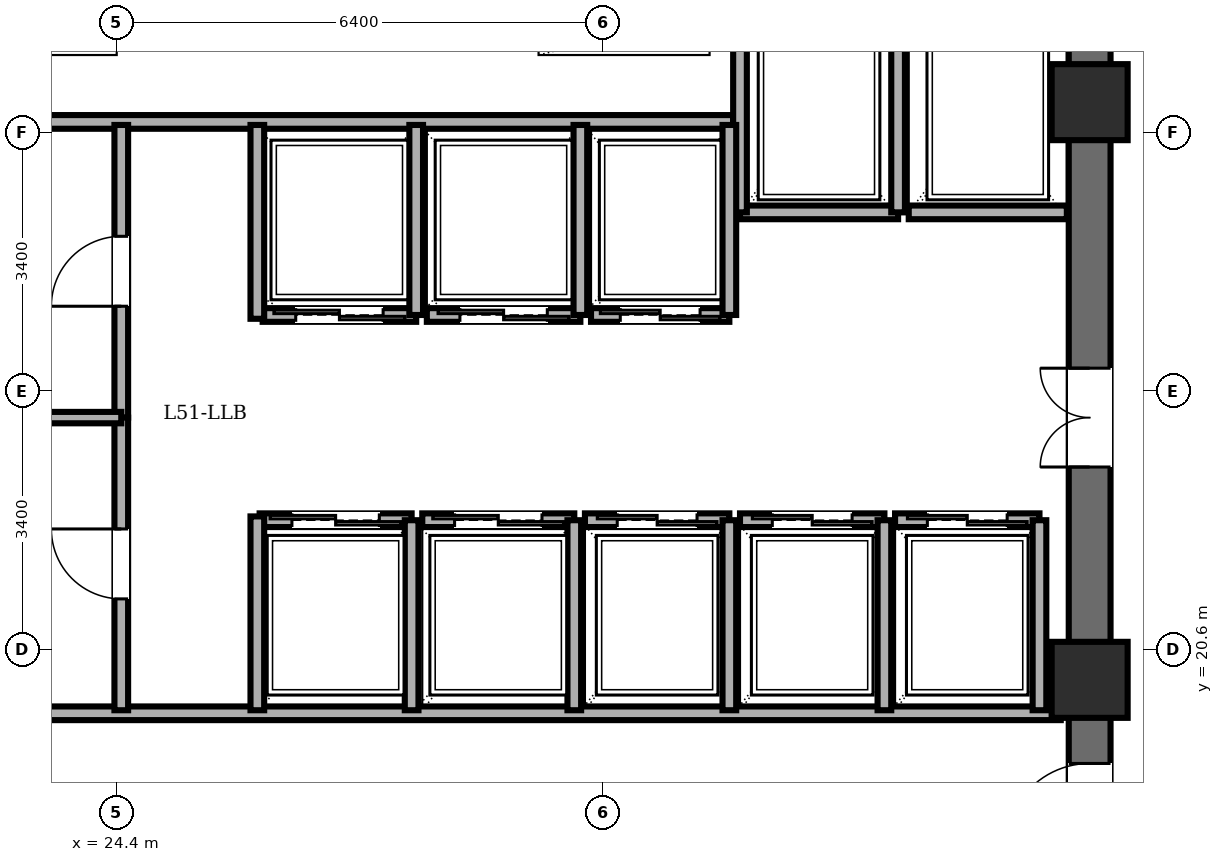
"""IFC4 building model, lengths in metres.
Left out: names, types, materials, properties, quantities, classifications, styles, units other than length and angle.
Written with IfcOpenShell. Run it as: python <this file> out.ifc"""

import sys

from ifc_helpers import new_model, si_unit, direction, frame, frame_2d, origin, origin_2d, place, context, subcontext, project, spatial, rectangle, extrude, element, fill, save


model = new_model("IFC4")
c1 = context("Model", 3, precision=1e-05, world=origin(), true_north=direction((0.0, 1.0)))
c2 = subcontext(c1, "Body", "Model", "MODEL_VIEW")
j1 = project(units=[si_unit("LENGTHUNIT", "METRE"), si_unit("PLANEANGLEUNIT", "RADIAN")], contexts=[c1])
p1 = place(None, origin())
s1 = spatial("IfcSite", under=j1, at=p1, CompositionType="ELEMENT")
p2 = place(p1, origin())
s2 = spatial("IfcBuilding", under=s1, at=p2, CompositionType="ELEMENT")
p3 = place(p2, frame((0.0, 0.0, 196.2)))
s3 = spatial("IfcBuildingStorey", under=s2, at=p3, CompositionType="ELEMENT", Elevation=196.2)
for number, where, z_axis, x_axis in (
    (1, (37.2, 20.2, 0.0), (0.0, 0.0, 1.0), (1.0, 0.0, 0.0)),
    (2, (37.2, 27.8, 0.0), (0.0, 0.0, 1.0), (1.0, 0.0, 0.0)),
):
    element("IfcColumn", number, at=place(p3, frame(where, z_axis=z_axis, x_axis=x_axis)), inside=s3, PredefinedType="COLUMN", context=c2, shape_type="SweptSolid", body=[
        extrude(rectangle(XDim=1.0, YDim=1.0, at=origin_2d()), origin(), (0.0, 0.0, 1.0), 5.1),
    ])
p4 = place(p3, frame((37.2, 14.4, 0.0), z_axis=(0.0, 0.0, 1.0), x_axis=(0.0, 1.0, 0.0)))
e3 = element("IfcWall", 3, at=p4, inside=s3, PredefinedType="SHEAR", context=c2, shape_type="SweptSolid", body=[
    extrude(rectangle(XDim=19.2, YDim=0.55, at=frame_2d((9.6, 0.0))), origin(), (0.0, 0.0, 1.0), 4.9),
])
p5 = place(p4, frame((15.8, 0.0, 0.0)))
e4 = element("IfcOpeningElement", 4, at=p5, cuts=e3, PredefinedType="OPENING", context=c2, shape_type="SweptSolid", body=[
    extrude(rectangle(XDim=1.15, YDim=2.15, at=frame_2d((0.575, 1.075))), frame((0.0, 0.285, 0.0), z_axis=(0.0, -1.0, 0.0), x_axis=(1.0, 0.0, 0.0)), (0.0, 0.0, 1.0), 0.57),
])
p6 = place(p4, frame((3.6, 0.0, 0.0)))
e5 = element("IfcOpeningElement", 5, at=p6, cuts=e3, PredefinedType="OPENING", context=c2, shape_type="SweptSolid", body=[
    extrude(rectangle(XDim=1.1, YDim=2.15, at=frame_2d((0.55, 1.075))), frame((0.0, 0.285, 0.0), z_axis=(0.0, -1.0, 0.0), x_axis=(1.0, 0.0, 0.0)), (0.0, 0.0, 1.0), 0.57),
])
p7 = place(p4, frame((8.6, 0.0, 0.0)))
e6 = element("IfcOpeningElement", 6, at=p7, cuts=e3, PredefinedType="OPENING", context=c2, shape_type="SweptSolid", body=[
    extrude(rectangle(XDim=1.3, YDim=2.2, at=frame_2d((0.65, 1.1))), frame((0.0, 0.285, 0.0), z_axis=(0.0, -1.0, 0.0), x_axis=(1.0, 0.0, 0.0)), (0.0, 0.0, 1.0), 0.57),
])
p8 = place(p3, frame((21.95, 27.54, 0.0), z_axis=(0.0, 0.0, 1.0), x_axis=(1.0, 0.0, 0.0)))
e7 = element("IfcWall", 7, at=p8, inside=s3, PredefinedType="PARTITIONING", context=c2, shape_type="SweptSolid", body=[
    extrude(rectangle(XDim=10.56, YDim=0.18, at=frame_2d((5.28, 0.0))), origin(), (0.0, 0.0, 1.0), 4.9),
])
p9 = place(p3, frame((21.95, 19.76, 0.0), z_axis=(0.0, 0.0, 1.0), x_axis=(1.0, 0.0, 0.0)))
e8 = element("IfcWall", 8, at=p9, inside=s3, PredefinedType="PARTITIONING", context=c2, shape_type="SweptSolid", body=[
    extrude(rectangle(XDim=14.87, YDim=0.18, at=frame_2d((7.435, 0.0))), origin(), (0.0, 0.0, 1.0), 4.9),
])
p10 = place(p3, frame((34.68, 26.35, 0.0), z_axis=(0.0, 0.0, 1.0), x_axis=(-1.0, 0.0, 0.0)))
e9 = element("IfcWall", 9, at=p10, inside=s3, PredefinedType="PARTITIONING", context=c2, shape_type="SweptSolid", body=[
    extrude(rectangle(XDim=2.08, YDim=0.18, at=frame_2d((1.04, 0.0))), origin(), (0.0, 0.0, 1.0), 4.9),
])
for number, where, z_axis, x_axis in (
    (10, (34.68, 26.35, 0.0), (0.0, 0.0, 1.0), (0.0, 1.0, 0.0)),
    (11, (32.6, 29.08, 0.0), (0.0, 0.0, 1.0), (0.0, -1.0, 0.0)),
):
    element("IfcWall", number, at=place(p3, frame(where, z_axis=z_axis, x_axis=x_axis)), inside=s3, PredefinedType="PARTITIONING", context=c2, shape_type="SweptSolid", body=[
        extrude(rectangle(XDim=2.73, YDim=0.18, at=frame_2d((1.365, 0.0))), origin(), (0.0, 0.0, 1.0), 4.9),
    ])
p11 = place(p3, frame((36.9, 26.35, 0.0), z_axis=(0.0, 0.0, 1.0), x_axis=(-1.0, 0.0, 0.0)))
e12 = element("IfcWall", 12, at=p11, inside=s3, PredefinedType="PARTITIONING", context=c2, shape_type="SweptSolid", body=[
    extrude(rectangle(XDim=2.08, YDim=0.18, at=frame_2d((1.04, 0.0))), origin(), (0.0, 0.0, 1.0), 4.9),
])
p12 = place(p3, frame((28.34, 25.0, 0.0), z_axis=(0.0, 0.0, 1.0), x_axis=(-1.0, 0.0, 0.0)))
e13 = element("IfcWall", 13, at=p12, inside=s3, PredefinedType="PARTITIONING", context=c2, shape_type="SweptSolid", body=[
    extrude(rectangle(XDim=2.02, YDim=0.18, at=frame_2d((1.01, 0.0))), origin(), (0.0, 0.0, 1.0), 4.9),
])
p13 = place(p12, frame((0.435, 0.0, 0.0)))
e14 = element("IfcOpeningElement", 14, at=p13, cuts=e13, PredefinedType="OPENING", context=c2, shape_type="SweptSolid", body=[
    extrude(rectangle(XDim=1.15, YDim=2.2, at=frame_2d((0.575, 1.1))), frame((0.0, 0.1, 0.0), z_axis=(0.0, -1.0, 0.0), x_axis=(1.0, 0.0, 0.0)), (0.0, 0.0, 1.0), 0.2),
])
p14 = place(p3, frame((28.34, 25.0, 0.0), z_axis=(0.0, 0.0, 1.0), x_axis=(0.0, 1.0, 0.0)))
e15 = element("IfcWall", 15, at=p14, inside=s3, PredefinedType="PARTITIONING", context=c2, shape_type="SweptSolid", body=[
    extrude(rectangle(XDim=2.5, YDim=0.18, at=frame_2d((1.25, 0.0))), origin(), (0.0, 0.0, 1.0), 4.9),
])
p15 = place(p3, frame((30.5, 25.0, 0.0), z_axis=(0.0, 0.0, 1.0), x_axis=(-1.0, 0.0, 0.0)))
e16 = element("IfcWall", 16, at=p15, inside=s3, PredefinedType="PARTITIONING", context=c2, shape_type="SweptSolid", body=[
    extrude(rectangle(XDim=2.02, YDim=0.18, at=frame_2d((1.01, 0.0))), origin(), (0.0, 0.0, 1.0), 4.9),
])
p16 = place(p15, frame((0.435, 0.0, 0.0)))
e17 = element("IfcOpeningElement", 17, at=p16, cuts=e16, PredefinedType="OPENING", context=c2, shape_type="SweptSolid", body=[
    extrude(rectangle(XDim=1.15, YDim=2.2, at=frame_2d((0.575, 1.1))), frame((0.0, 0.1, 0.0), z_axis=(0.0, -1.0, 0.0), x_axis=(1.0, 0.0, 0.0)), (0.0, 0.0, 1.0), 0.2),
])
p17 = place(p3, frame((30.5, 25.0, 0.0), z_axis=(0.0, 0.0, 1.0), x_axis=(0.0, 1.0, 0.0)))
e18 = element("IfcWall", 18, at=p17, inside=s3, PredefinedType="PARTITIONING", context=c2, shape_type="SweptSolid", body=[
    extrude(rectangle(XDim=2.5, YDim=0.18, at=frame_2d((1.25, 0.0))), origin(), (0.0, 0.0, 1.0), 4.9),
])
p18 = place(p3, frame((26.28, 22.3, 0.0), z_axis=(0.0, 0.0, 1.0), x_axis=(1.0, 0.0, 0.0)))
e19 = element("IfcWall", 19, at=p18, inside=s3, PredefinedType="PARTITIONING", context=c2, shape_type="SweptSolid", body=[
    extrude(rectangle(XDim=2.0, YDim=0.18, at=frame_2d((1.0, 0.0))), origin(), (0.0, 0.0, 1.0), 4.9),
])
p19 = place(p18, frame((0.425, 0.0, 0.0)))
e20 = element("IfcOpeningElement", 20, at=p19, cuts=e19, PredefinedType="OPENING", context=c2, shape_type="SweptSolid", body=[
    extrude(rectangle(XDim=1.15, YDim=2.2, at=frame_2d((0.575, 1.1))), frame((0.0, 0.1, 0.0), z_axis=(0.0, -1.0, 0.0), x_axis=(1.0, 0.0, 0.0)), (0.0, 0.0, 1.0), 0.2),
])
p20 = place(p3, frame((28.28, 19.8, 0.0), z_axis=(0.0, 0.0, 1.0), x_axis=(0.0, 1.0, 0.0)))
e21 = element("IfcWall", 21, at=p20, inside=s3, PredefinedType="PARTITIONING", context=c2, shape_type="SweptSolid", body=[
    extrude(rectangle(XDim=2.5, YDim=0.18, at=frame_2d((1.25, 0.0))), origin(), (0.0, 0.0, 1.0), 4.9),
])
p21 = place(p3, frame((28.42, 22.3, 0.0), z_axis=(0.0, 0.0, 1.0), x_axis=(1.0, 0.0, 0.0)))
e22 = element("IfcWall", 22, at=p21, inside=s3, PredefinedType="PARTITIONING", context=c2, shape_type="SweptSolid", body=[
    extrude(rectangle(XDim=2.0, YDim=0.18, at=frame_2d((1.0, 0.0))), origin(), (0.0, 0.0, 1.0), 4.9),
])
p22 = place(p21, frame((0.425, 0.0, 0.0)))
e23 = element("IfcOpeningElement", 23, at=p22, cuts=e22, PredefinedType="OPENING", context=c2, shape_type="SweptSolid", body=[
    extrude(rectangle(XDim=1.15, YDim=2.2, at=frame_2d((0.575, 1.1))), frame((0.0, 0.1, 0.0), z_axis=(0.0, -1.0, 0.0), x_axis=(1.0, 0.0, 0.0)), (0.0, 0.0, 1.0), 0.2),
])
p23 = place(p3, frame((30.42, 19.8, 0.0), z_axis=(0.0, 0.0, 1.0), x_axis=(0.0, 1.0, 0.0)))
e24 = element("IfcWall", 24, at=p23, inside=s3, PredefinedType="PARTITIONING", context=c2, shape_type="SweptSolid", body=[
    extrude(rectangle(XDim=2.5, YDim=0.18, at=frame_2d((1.25, 0.0))), origin(), (0.0, 0.0, 1.0), 4.9),
])
p24 = place(p3, frame((32.46, 25.0, 0.0), z_axis=(0.0, 0.0, 1.0), x_axis=(-1.0, 0.0, 0.0)))
e25 = element("IfcWall", 25, at=p24, inside=s3, PredefinedType="PARTITIONING", context=c2, shape_type="SweptSolid", body=[
    extrude(rectangle(XDim=1.82, YDim=0.18, at=frame_2d((0.91, 0.0))), origin(), (0.0, 0.0, 1.0), 4.9),
])
p25 = place(p24, frame((0.385, 0.0, 0.0)))
e26 = element("IfcOpeningElement", 26, at=p25, cuts=e25, PredefinedType="OPENING", context=c2, shape_type="SweptSolid", body=[
    extrude(rectangle(XDim=1.05, YDim=2.2, at=frame_2d((0.525, 1.1))), frame((0.0, 0.1, 0.0), z_axis=(0.0, -1.0, 0.0), x_axis=(1.0, 0.0, 0.0)), (0.0, 0.0, 1.0), 0.2),
])
p26 = place(p3, frame((32.46, 25.0, 0.0), z_axis=(0.0, 0.0, 1.0), x_axis=(0.0, 1.0, 0.0)))
e27 = element("IfcWall", 27, at=p26, inside=s3, PredefinedType="PARTITIONING", context=c2, shape_type="SweptSolid", body=[
    extrude(rectangle(XDim=2.5, YDim=0.18, at=frame_2d((1.25, 0.0))), origin(), (0.0, 0.0, 1.0), 4.9),
])
p27 = place(p3, frame((30.56, 22.3, 0.0), z_axis=(0.0, 0.0, 1.0), x_axis=(1.0, 0.0, 0.0)))
e28 = element("IfcWall", 28, at=p27, inside=s3, PredefinedType="PARTITIONING", context=c2, shape_type="SweptSolid", body=[
    extrude(rectangle(XDim=1.9, YDim=0.18, at=frame_2d((0.95, 0.0))), origin(), (0.0, 0.0, 1.0), 4.9),
])
p28 = place(p27, frame((0.425, 0.0, 0.0)))
e29 = element("IfcOpeningElement", 29, at=p28, cuts=e28, PredefinedType="OPENING", context=c2, shape_type="SweptSolid", body=[
    extrude(rectangle(XDim=1.05, YDim=2.2, at=frame_2d((0.525, 1.1))), frame((0.0, 0.1, 0.0), z_axis=(0.0, -1.0, 0.0), x_axis=(1.0, 0.0, 0.0)), (0.0, 0.0, 1.0), 0.2),
])
p29 = place(p3, frame((32.46, 19.8, 0.0), z_axis=(0.0, 0.0, 1.0), x_axis=(0.0, 1.0, 0.0)))
e30 = element("IfcWall", 30, at=p29, inside=s3, PredefinedType="PARTITIONING", context=c2, shape_type="SweptSolid", body=[
    extrude(rectangle(XDim=2.5, YDim=0.18, at=frame_2d((1.25, 0.0))), origin(), (0.0, 0.0, 1.0), 4.9),
])
p30 = place(p3, frame((32.6, 22.3, 0.0), z_axis=(0.0, 0.0, 1.0), x_axis=(1.0, 0.0, 0.0)))
e31 = element("IfcWall", 31, at=p30, inside=s3, PredefinedType="PARTITIONING", context=c2, shape_type="SweptSolid", body=[
    extrude(rectangle(XDim=1.9, YDim=0.18, at=frame_2d((0.95, 0.0))), origin(), (0.0, 0.0, 1.0), 4.9),
])
p31 = place(p30, frame((0.425, 0.0, 0.0)))
e32 = element("IfcOpeningElement", 32, at=p31, cuts=e31, PredefinedType="OPENING", context=c2, shape_type="SweptSolid", body=[
    extrude(rectangle(XDim=1.05, YDim=2.2, at=frame_2d((0.525, 1.1))), frame((0.0, 0.1, 0.0), z_axis=(0.0, -1.0, 0.0), x_axis=(1.0, 0.0, 0.0)), (0.0, 0.0, 1.0), 0.2),
])
p32 = place(p3, frame((34.5, 19.8, 0.0), z_axis=(0.0, 0.0, 1.0), x_axis=(0.0, 1.0, 0.0)))
e33 = element("IfcWall", 33, at=p32, inside=s3, PredefinedType="PARTITIONING", context=c2, shape_type="SweptSolid", body=[
    extrude(rectangle(XDim=2.5, YDim=0.18, at=frame_2d((1.25, 0.0))), origin(), (0.0, 0.0, 1.0), 4.9),
])
p33 = place(p3, frame((34.64, 22.3, 0.0), z_axis=(0.0, 0.0, 1.0), x_axis=(1.0, 0.0, 0.0)))
e34 = element("IfcWall", 34, at=p33, inside=s3, PredefinedType="PARTITIONING", context=c2, shape_type="SweptSolid", body=[
    extrude(rectangle(XDim=1.9, YDim=0.18, at=frame_2d((0.95, 0.0))), origin(), (0.0, 0.0, 1.0), 4.9),
])
p34 = place(p33, frame((0.425, 0.0, 0.0)))
e35 = element("IfcOpeningElement", 35, at=p34, cuts=e34, PredefinedType="OPENING", context=c2, shape_type="SweptSolid", body=[
    extrude(rectangle(XDim=1.05, YDim=2.2, at=frame_2d((0.525, 1.1))), frame((0.0, 0.1, 0.0), z_axis=(0.0, -1.0, 0.0), x_axis=(1.0, 0.0, 0.0)), (0.0, 0.0, 1.0), 0.2),
])
p35 = place(p3, frame((36.54, 19.8, 0.0), z_axis=(0.0, 0.0, 1.0), x_axis=(0.0, 1.0, 0.0)))
e36 = element("IfcWall", 36, at=p35, inside=s3, PredefinedType="PARTITIONING", context=c2, shape_type="SweptSolid", body=[
    extrude(rectangle(XDim=2.5, YDim=0.18, at=frame_2d((1.25, 0.0))), origin(), (0.0, 0.0, 1.0), 4.9),
])
p36 = place(p3, frame((24.46, 23.65, 0.0), z_axis=(0.0, 0.0, 1.0), x_axis=(0.0, 1.0, 0.0)))
e37 = element("IfcWall", 37, at=p36, inside=s3, PredefinedType="PARTITIONING", context=c2, shape_type="SweptSolid", body=[
    extrude(rectangle(XDim=3.85, YDim=0.18, at=frame_2d((1.925, 0.0))), origin(), (0.0, 0.0, 1.0), 4.9),
])
p37 = place(p36, frame((1.465, 0.0, 0.0)))
e38 = element("IfcOpeningElement", 38, at=p37, cuts=e37, PredefinedType="OPENING", context=c2, shape_type="SweptSolid", body=[
    extrude(rectangle(XDim=0.92, YDim=2.1, at=frame_2d((0.46, 1.05))), frame((0.0, 0.1, 0.0), z_axis=(0.0, -1.0, 0.0), x_axis=(1.0, 0.0, 0.0)), (0.0, 0.0, 1.0), 0.2),
])
p38 = place(p3, frame((24.46, 19.8, 0.0), z_axis=(0.0, 0.0, 1.0), x_axis=(0.0, 1.0, 0.0)))
e39 = element("IfcWall", 39, at=p38, inside=s3, PredefinedType="PARTITIONING", context=c2, shape_type="SweptSolid", body=[
    extrude(rectangle(XDim=3.85, YDim=0.18, at=frame_2d((1.925, 0.0))), origin(), (0.0, 0.0, 1.0), 4.9),
])
p39 = place(p38, frame((1.465, 0.0, 0.0)))
e40 = element("IfcOpeningElement", 40, at=p39, cuts=e39, PredefinedType="OPENING", context=c2, shape_type="SweptSolid", body=[
    extrude(rectangle(XDim=0.92, YDim=2.1, at=frame_2d((0.46, 1.05))), frame((0.0, 0.1, 0.0), z_axis=(0.0, -1.0, 0.0), x_axis=(1.0, 0.0, 0.0)), (0.0, 0.0, 1.0), 0.2),
])
p40 = place(p3, frame((21.95, 23.65, 0.0), z_axis=(0.0, 0.0, 1.0), x_axis=(1.0, 0.0, 0.0)))
e41 = element("IfcWall", 41, at=p40, inside=s3, PredefinedType="PARTITIONING", context=c2, shape_type="SweptSolid", body=[
    extrude(rectangle(XDim=2.51, YDim=0.15, at=frame_2d((1.255, 0.0))), origin(), (0.0, 0.0, 1.0), 4.9),
])
for number, where, z_axis, x_axis in (
    (42, (26.25, 24.95, 0.0), (0.0, 0.0, 1.0), (0.0, 1.0, 0.0)),
    (43, (26.25, 19.8, 0.0), (0.0, 0.0, 1.0), (0.0, 1.0, 0.0)),
):
    element("IfcWall", number, at=place(p3, frame(where, z_axis=z_axis, x_axis=x_axis)), inside=s3, PredefinedType="PARTITIONING", context=c2, shape_type="SweptSolid", body=[
        extrude(rectangle(XDim=2.55, YDim=0.18, at=frame_2d((1.275, 0.0))), origin(), (0.0, 0.0, 1.0), 4.9),
    ])
p41 = place(p6, origin())
e44 = element("IfcDoor", 44, at=p41, inside=s3, OperationType="SINGLE_SWING_LEFT", PredefinedType="DOOR", context=c2, shape_type="SweptSolid", body=[
    extrude(rectangle(XDim=1.1, YDim=2.15, at=frame_2d((0.55, 1.075))), frame((0.0, 0.025, 0.0), z_axis=(0.0, -1.0, 0.0), x_axis=(1.0, 0.0, 0.0)), (0.0, 0.0, 1.0), 0.05),
])
fill(e5, e44)
p42 = place(p13, origin())
e45 = element("IfcDoor", 45, at=p42, inside=s3, OperationType="DOUBLE_DOOR_SLIDING", PredefinedType="DOOR", context=c2, shape_type="SweptSolid", body=[
    extrude(rectangle(XDim=1.15, YDim=2.2, at=frame_2d((0.575, 1.1))), frame((0.0, 0.025, 0.0), z_axis=(0.0, -1.0, 0.0), x_axis=(1.0, 0.0, 0.0)), (0.0, 0.0, 1.0), 0.05),
])
fill(e14, e45)
p43 = place(p16, origin())
e46 = element("IfcDoor", 46, at=p43, inside=s3, OperationType="DOUBLE_DOOR_SLIDING", PredefinedType="DOOR", context=c2, shape_type="SweptSolid", body=[
    extrude(rectangle(XDim=1.15, YDim=2.2, at=frame_2d((0.575, 1.1))), frame((0.0, 0.025, 0.0), z_axis=(0.0, -1.0, 0.0), x_axis=(1.0, 0.0, 0.0)), (0.0, 0.0, 1.0), 0.05),
])
fill(e17, e46)
p44 = place(p19, origin())
e47 = element("IfcDoor", 47, at=p44, inside=s3, OperationType="DOUBLE_DOOR_SLIDING", PredefinedType="DOOR", context=c2, shape_type="SweptSolid", body=[
    extrude(rectangle(XDim=1.15, YDim=2.2, at=frame_2d((0.575, 1.1))), frame((0.0, 0.025, 0.0), z_axis=(0.0, -1.0, 0.0), x_axis=(1.0, 0.0, 0.0)), (0.0, 0.0, 1.0), 0.05),
])
fill(e20, e47)
p45 = place(p22, origin())
e48 = element("IfcDoor", 48, at=p45, inside=s3, OperationType="DOUBLE_DOOR_SLIDING", PredefinedType="DOOR", context=c2, shape_type="SweptSolid", body=[
    extrude(rectangle(XDim=1.15, YDim=2.2, at=frame_2d((0.575, 1.1))), frame((0.0, 0.025, 0.0), z_axis=(0.0, -1.0, 0.0), x_axis=(1.0, 0.0, 0.0)), (0.0, 0.0, 1.0), 0.05),
])
fill(e23, e48)
p46 = place(p25, origin())
e49 = element("IfcDoor", 49, at=p46, inside=s3, OperationType="DOUBLE_DOOR_SLIDING", PredefinedType="DOOR", context=c2, shape_type="SweptSolid", body=[
    extrude(rectangle(XDim=1.05, YDim=2.2, at=frame_2d((0.525, 1.1))), frame((0.0, 0.025, 0.0), z_axis=(0.0, -1.0, 0.0), x_axis=(1.0, 0.0, 0.0)), (0.0, 0.0, 1.0), 0.05),
])
fill(e26, e49)
p47 = place(p28, origin())
e50 = element("IfcDoor", 50, at=p47, inside=s3, OperationType="DOUBLE_DOOR_SLIDING", PredefinedType="DOOR", context=c2, shape_type="SweptSolid", body=[
    extrude(rectangle(XDim=1.05, YDim=2.2, at=frame_2d((0.525, 1.1))), frame((0.0, 0.025, 0.0), z_axis=(0.0, -1.0, 0.0), x_axis=(1.0, 0.0, 0.0)), (0.0, 0.0, 1.0), 0.05),
])
fill(e29, e50)
p48 = place(p31, origin())
e51 = element("IfcDoor", 51, at=p48, inside=s3, OperationType="DOUBLE_DOOR_SLIDING", PredefinedType="DOOR", context=c2, shape_type="SweptSolid", body=[
    extrude(rectangle(XDim=1.05, YDim=2.2, at=frame_2d((0.525, 1.1))), frame((0.0, 0.025, 0.0), z_axis=(0.0, -1.0, 0.0), x_axis=(1.0, 0.0, 0.0)), (0.0, 0.0, 1.0), 0.05),
])
fill(e32, e51)
p49 = place(p34, origin())
e52 = element("IfcDoor", 52, at=p49, inside=s3, OperationType="DOUBLE_DOOR_SLIDING", PredefinedType="DOOR", context=c2, shape_type="SweptSolid", body=[
    extrude(rectangle(XDim=1.05, YDim=2.2, at=frame_2d((0.525, 1.1))), frame((0.0, 0.025, 0.0), z_axis=(0.0, -1.0, 0.0), x_axis=(1.0, 0.0, 0.0)), (0.0, 0.0, 1.0), 0.05),
])
fill(e35, e52)
p50 = place(p37, origin())
e53 = element("IfcDoor", 53, at=p50, inside=s3, OperationType="SINGLE_SWING_LEFT", PredefinedType="DOOR", context=c2, shape_type="SweptSolid", body=[
    extrude(rectangle(XDim=0.92, YDim=2.1, at=frame_2d((0.46, 1.05))), frame((0.0, 0.025, 0.0), z_axis=(0.0, -1.0, 0.0), x_axis=(1.0, 0.0, 0.0)), (0.0, 0.0, 1.0), 0.05),
])
fill(e38, e53)
p51 = place(p39, origin())
e54 = element("IfcDoor", 54, at=p51, inside=s3, OperationType="SINGLE_SWING_RIGHT", PredefinedType="DOOR", context=c2, shape_type="SweptSolid", body=[
    extrude(rectangle(XDim=0.92, YDim=2.1, at=frame_2d((0.46, 1.05))), frame((0.0, 0.025, 0.0), z_axis=(0.0, -1.0, 0.0), x_axis=(1.0, 0.0, 0.0)), (0.0, 0.0, 1.0), 0.05),
])
fill(e40, e54)
p52 = place(p7, origin())
e55 = element("IfcDoor", 55, at=p52, inside=s3, OperationType="DOUBLE_DOOR_SINGLE_SWING", PredefinedType="DOOR", context=c2, shape_type="SweptSolid", body=[
    extrude(rectangle(XDim=1.3, YDim=2.2, at=frame_2d((0.65, 1.1))), frame((0.0, 0.025, 0.0), z_axis=(0.0, -1.0, 0.0), x_axis=(1.0, 0.0, 0.0)), (0.0, 0.0, 1.0), 0.05),
])
fill(e6, e55)
save(model, sys.argv[1])
